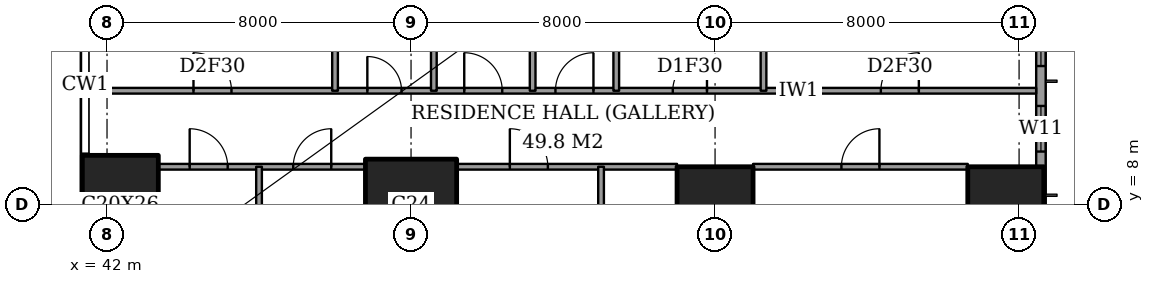
"""IFC4 building model, lengths in metres.
Left out: names, types, materials, properties, quantities, classifications, styles, units other than length and angle.
Written with IfcOpenShell. Run it as: python <this file> out.ifc"""

import sys

from ifc_helpers import new_model, si_unit, direction, frame, frame_2d, origin, origin_2d, place, context, subcontext, project, spatial, rectangle, extrude, element, fill, save


model = new_model("IFC4")
c1 = context("Model", 3, precision=1e-05, world=origin(), true_north=direction((0.0, 1.0)))
c2 = subcontext(c1, "Body", "Model", "MODEL_VIEW")
j1 = project(units=[si_unit("LENGTHUNIT", "METRE"), si_unit("PLANEANGLEUNIT", "RADIAN")], contexts=[c1])
p1 = place(None, origin())
s1 = spatial("IfcSite", under=j1, at=p1, CompositionType="ELEMENT")
p2 = place(p1, origin())
s2 = spatial("IfcBuilding", under=s1, at=p2, CompositionType="ELEMENT")
p3 = place(p2, frame((0.0, 0.0, 164.6)))
s3 = spatial("IfcBuildingStorey", under=s2, at=p3, CompositionType="ELEMENT", Elevation=164.6)
p4 = place(p3, frame((42.35, 8.0, 0.0), z_axis=(0.0, 0.0, 1.0), x_axis=(1.0, 0.0, 0.0)))
e1 = element("IfcColumn", 1, at=p4, inside=s3, PredefinedType="COLUMN", context=c2, shape_type="SweptSolid", body=[
    extrude(rectangle(XDim=2.0, YDim=2.6, at=origin_2d()), origin(), (0.0, 0.0, 1.0), 3.6),
])
p5 = place(p3, frame((50.0, 8.0, 0.0), z_axis=(0.0, 0.0, 1.0), x_axis=(1.0, 0.0, 0.0)))
e2 = element("IfcColumn", 2, at=p5, inside=s3, PredefinedType="COLUMN", context=c2, shape_type="SweptSolid", body=[
    extrude(rectangle(XDim=2.4, YDim=2.4, at=origin_2d()), origin(), (0.0, 0.0, 1.0), 3.6),
])
for number, where, z_axis, x_axis in (
    (3, (58.0, 8.0, 0.0), (0.0, 0.0, 1.0), (1.0, 0.0, 0.0)),
    (4, (65.65, 8.0, 0.0), (0.0, 0.0, 1.0), (1.0, 0.0, 0.0)),
):
    element("IfcColumn", number, at=place(p3, frame(where, z_axis=z_axis, x_axis=x_axis)), inside=s3, PredefinedType="COLUMN", context=c2, shape_type="SweptSolid", body=[
        extrude(rectangle(XDim=2.0, YDim=2.0, at=origin_2d()), origin(), (0.0, 0.0, 1.0), 3.6),
    ])
p6 = place(p3, frame((66.575, 3.175, 0.0), z_axis=(0.0, 0.0, 1.0), x_axis=(0.0, 1.0, 0.0)))
e5 = element("IfcWall", 5, at=p6, inside=s3, PredefinedType="SOLIDWALL", context=c2, shape_type="SweptSolid", body=[
    extrude(rectangle(XDim=41.65, YDim=0.25, at=frame_2d((20.825, 0.0))), origin(), (0.0, 0.0, 1.0), 3.6),
])
p7 = place(p6, frame((0.775, 0.0, 0.4)))
e6 = element("IfcOpeningElement", 6, at=p7, cuts=e5, PredefinedType="OPENING", context=c2, shape_type="SweptSolid", body=[
    extrude(rectangle(XDim=2.4, YDim=2.2, at=frame_2d((1.2, 1.1))), frame((0.0, 0.135, 0.0), z_axis=(0.0, -1.0, 0.0), x_axis=(1.0, 0.0, 0.0)), (0.0, 0.0, 1.0), 0.27),
])
p8 = place(p6, frame((6.225, 0.0, 0.4)))
e7 = element("IfcOpeningElement", 7, at=p8, cuts=e5, PredefinedType="OPENING", context=c2, shape_type="SweptSolid", body=[
    extrude(rectangle(XDim=1.2, YDim=2.2, at=frame_2d((0.6, 1.1))), frame((0.0, 0.135, 0.0), z_axis=(0.0, -1.0, 0.0), x_axis=(1.0, 0.0, 0.0)), (0.0, 0.0, 1.0), 0.27),
])
p9 = place(p6, frame((8.475, 0.0, 0.4)))
e8 = element("IfcOpeningElement", 8, at=p9, cuts=e5, PredefinedType="OPENING", context=c2, shape_type="SweptSolid", body=[
    extrude(rectangle(XDim=2.4, YDim=2.2, at=frame_2d((1.2, 1.1))), frame((0.0, 0.135, 0.0), z_axis=(0.0, -1.0, 0.0), x_axis=(1.0, 0.0, 0.0)), (0.0, 0.0, 1.0), 0.27),
])
p10 = place(p6, frame((15.775, 0.0, 0.4)))
e9 = element("IfcOpeningElement", 9, at=p10, cuts=e5, PredefinedType="OPENING", context=c2, shape_type="SweptSolid", body=[
    extrude(rectangle(XDim=2.4, YDim=2.2, at=frame_2d((1.2, 1.1))), frame((0.0, 0.135, 0.0), z_axis=(0.0, -1.0, 0.0), x_axis=(1.0, 0.0, 0.0)), (0.0, 0.0, 1.0), 0.27),
])
p11 = place(p6, frame((23.475, 0.0, 0.4)))
e10 = element("IfcOpeningElement", 10, at=p11, cuts=e5, PredefinedType="OPENING", context=c2, shape_type="SweptSolid", body=[
    extrude(rectangle(XDim=2.4, YDim=2.2, at=frame_2d((1.2, 1.1))), frame((0.0, 0.135, 0.0), z_axis=(0.0, -1.0, 0.0), x_axis=(1.0, 0.0, 0.0)), (0.0, 0.0, 1.0), 0.27),
])
p12 = place(p6, frame((30.975, 0.0, 0.4)))
e11 = element("IfcOpeningElement", 11, at=p12, cuts=e5, PredefinedType="OPENING", context=c2, shape_type="SweptSolid", body=[
    extrude(rectangle(XDim=2.4, YDim=2.2, at=frame_2d((1.2, 1.1))), frame((0.0, 0.135, 0.0), z_axis=(0.0, -1.0, 0.0), x_axis=(1.0, 0.0, 0.0)), (0.0, 0.0, 1.0), 0.27),
])
p13 = place(p6, frame((34.5, 0.0, 0.4)))
e12 = element("IfcOpeningElement", 12, at=p13, cuts=e5, PredefinedType="OPENING", context=c2, shape_type="SweptSolid", body=[
    extrude(rectangle(XDim=1.2, YDim=2.2, at=frame_2d((0.6, 1.1))), frame((0.0, 0.135, 0.0), z_axis=(0.0, -1.0, 0.0), x_axis=(1.0, 0.0, 0.0)), (0.0, 0.0, 1.0), 0.27),
])
p14 = place(p6, frame((38.475, 0.0, 0.4)))
e13 = element("IfcOpeningElement", 13, at=p14, cuts=e5, PredefinedType="OPENING", context=c2, shape_type="SweptSolid", body=[
    extrude(rectangle(XDim=2.4, YDim=2.2, at=frame_2d((1.2, 1.1))), frame((0.0, 0.135, 0.0), z_axis=(0.0, -1.0, 0.0), x_axis=(1.0, 0.0, 0.0)), (0.0, 0.0, 1.0), 0.27),
])
p15 = place(p3, frame((43.35, 9.0, 0.0), z_axis=(0.0, 0.0, 1.0), x_axis=(1.0, 0.0, 0.0)))
e14 = element("IfcWall", 14, at=p15, inside=s3, PredefinedType="PARTITIONING", context=c2, shape_type="SweptSolid", body=[
    extrude(rectangle(XDim=5.45, YDim=0.15, at=frame_2d((2.725, 0.0))), origin(), (0.0, 0.0, 1.0), 3.35),
])
p16 = place(p15, frame((3.55, 0.0, 0.0)))
e15 = element("IfcOpeningElement", 15, at=p16, cuts=e14, PredefinedType="OPENING", context=c2, shape_type="SweptSolid", body=[
    extrude(rectangle(XDim=1.0, YDim=2.1, at=frame_2d((0.5, 1.05))), frame((0.0, 0.085, 0.0), z_axis=(0.0, -1.0, 0.0), x_axis=(1.0, 0.0, 0.0)), (0.0, 0.0, 1.0), 0.17),
])
p17 = place(p15, frame((0.825, 0.0, 0.0)))
e16 = element("IfcOpeningElement", 16, at=p17, cuts=e14, PredefinedType="OPENING", context=c2, shape_type="SweptSolid", body=[
    extrude(rectangle(XDim=1.0, YDim=2.1, at=frame_2d((0.5, 1.05))), frame((0.0, 0.085, 0.0), z_axis=(0.0, -1.0, 0.0), x_axis=(1.0, 0.0, 0.0)), (0.0, 0.0, 1.0), 0.17),
])
p18 = place(p3, frame((51.2, 9.0, 0.0), z_axis=(0.0, 0.0, 1.0), x_axis=(1.0, 0.0, 0.0)))
e17 = element("IfcWall", 17, at=p18, inside=s3, PredefinedType="PARTITIONING", context=c2, shape_type="SweptSolid", body=[
    extrude(rectangle(XDim=5.8, YDim=0.15, at=frame_2d((2.9, 0.0))), origin(), (0.0, 0.0, 1.0), 3.35),
])
p19 = place(p18, frame((1.4, 0.0, 0.0)))
e18 = element("IfcOpeningElement", 18, at=p19, cuts=e17, PredefinedType="OPENING", context=c2, shape_type="SweptSolid", body=[
    extrude(rectangle(XDim=1.0, YDim=2.1, at=frame_2d((0.5, 1.05))), frame((0.0, 0.085, 0.0), z_axis=(0.0, -1.0, 0.0), x_axis=(1.0, 0.0, 0.0)), (0.0, 0.0, 1.0), 0.17),
])
p20 = place(p3, frame((59.0, 9.0, 0.0), z_axis=(0.0, 0.0, 1.0), x_axis=(1.0, 0.0, 0.0)))
e19 = element("IfcWall", 19, at=p20, inside=s3, PredefinedType="PARTITIONING", context=c2, shape_type="SweptSolid", body=[
    extrude(rectangle(XDim=5.65, YDim=0.15, at=frame_2d((2.825, 0.0))), origin(), (0.0, 0.0, 1.0), 3.35),
])
p21 = place(p20, frame((2.325, 0.0, 0.0)))
e20 = element("IfcOpeningElement", 20, at=p21, cuts=e19, PredefinedType="OPENING", context=c2, shape_type="SweptSolid", body=[
    extrude(rectangle(XDim=1.0, YDim=2.1, at=frame_2d((0.5, 1.05))), frame((0.0, 0.085, 0.0), z_axis=(0.0, -1.0, 0.0), x_axis=(1.0, 0.0, 0.0)), (0.0, 0.0, 1.0), 0.17),
])
p22 = place(p3, frame((41.439, 11.0, 0.0), z_axis=(0.0, 0.0, 1.0), x_axis=(1.0, 0.0, 0.0)))
e21 = element("IfcWall", 21, at=p22, inside=s3, PredefinedType="PARTITIONING", context=c2, shape_type="SweptSolid", body=[
    extrude(rectangle(XDim=25.011, YDim=0.15, at=frame_2d((12.505, 0.0))), origin(), (0.0, 0.0, 1.0), 3.35),
])
p23 = place(p22, frame((12.361, 0.0, 0.0)))
e22 = element("IfcOpeningElement", 22, at=p23, cuts=e21, PredefinedType="OPENING", context=c2, shape_type="SweptSolid", body=[
    extrude(rectangle(XDim=1.0, YDim=2.1, at=frame_2d((0.5, 1.05))), frame((0.0, 0.085, 0.0), z_axis=(0.0, -1.0, 0.0), x_axis=(1.0, 0.0, 0.0)), (0.0, 0.0, 1.0), 0.17),
])
p24 = place(p22, frame((20.924, 0.0, 0.0)))
e23 = element("IfcOpeningElement", 23, at=p24, cuts=e21, PredefinedType="OPENING", context=c2, shape_type="SweptSolid", body=[
    extrude(rectangle(XDim=1.0, YDim=2.1, at=frame_2d((0.5, 1.05))), frame((0.0, 0.085, 0.0), z_axis=(0.0, -1.0, 0.0), x_axis=(1.0, 0.0, 0.0)), (0.0, 0.0, 1.0), 0.17),
])
p25 = place(p22, frame((15.448, 0.0, 0.0)))
e24 = element("IfcOpeningElement", 24, at=p25, cuts=e21, PredefinedType="OPENING", context=c2, shape_type="SweptSolid", body=[
    extrude(rectangle(XDim=0.9, YDim=2.1, at=frame_2d((0.45, 1.05))), frame((0.0, 0.085, 0.0), z_axis=(0.0, -1.0, 0.0), x_axis=(1.0, 0.0, 0.0)), (0.0, 0.0, 1.0), 0.17),
])
p26 = place(p22, frame((9.961, 0.0, 0.0)))
e25 = element("IfcOpeningElement", 25, at=p26, cuts=e21, PredefinedType="OPENING", context=c2, shape_type="SweptSolid", body=[
    extrude(rectangle(XDim=1.0, YDim=2.1, at=frame_2d((0.5, 1.05))), frame((0.0, 0.085, 0.0), z_axis=(0.0, -1.0, 0.0), x_axis=(1.0, 0.0, 0.0)), (0.0, 0.0, 1.0), 0.17),
])
p27 = place(p22, frame((7.411, 0.0, 0.0)))
e26 = element("IfcOpeningElement", 26, at=p27, cuts=e21, PredefinedType="OPENING", context=c2, shape_type="SweptSolid", body=[
    extrude(rectangle(XDim=0.9, YDim=2.1, at=frame_2d((0.45, 1.05))), frame((0.0, 0.085, 0.0), z_axis=(0.0, -1.0, 0.0), x_axis=(1.0, 0.0, 0.0)), (0.0, 0.0, 1.0), 0.17),
])
p28 = place(p22, frame((2.836, 0.0, 0.0)))
e27 = element("IfcOpeningElement", 27, at=p28, cuts=e21, PredefinedType="OPENING", context=c2, shape_type="SweptSolid", body=[
    extrude(rectangle(XDim=1.0, YDim=2.1, at=frame_2d((0.5, 1.05))), frame((0.0, 0.085, 0.0), z_axis=(0.0, -1.0, 0.0), x_axis=(1.0, 0.0, 0.0)), (0.0, 0.0, 1.0), 0.17),
])
p29 = place(p3, frame((46.0, -0.45, 0.0), z_axis=(0.0, 0.0, 1.0), x_axis=(0.0, 1.0, 0.0)))
e28 = element("IfcWall", 28, at=p29, inside=s3, PredefinedType="PARTITIONING", context=c2, shape_type="SweptSolid", body=[
    extrude(rectangle(XDim=9.45, YDim=0.15, at=frame_2d((4.725, 0.0))), origin(), (0.0, 0.0, 1.0), 3.35),
])
p30 = place(p3, frame((48.0, 11.0, 0.0), z_axis=(0.0, 0.0, 1.0), x_axis=(0.0, 1.0, 0.0)))
e29 = element("IfcWall", 29, at=p30, inside=s3, PredefinedType="PARTITIONING", context=c2, shape_type="SweptSolid", body=[
    extrude(rectangle(XDim=6.5, YDim=0.15, at=frame_2d((3.25, 0.0))), origin(), (0.0, 0.0, 1.0), 3.35),
])
p31 = place(p3, frame((50.6, 11.0, 0.0), z_axis=(0.0, 0.0, 1.0), x_axis=(0.0, 1.0, 0.0)))
e30 = element("IfcWall", 30, at=p31, inside=s3, PredefinedType="PARTITIONING", context=c2, shape_type="SweptSolid", body=[
    extrude(rectangle(XDim=3.8, YDim=0.15, at=frame_2d((1.9, 0.0))), origin(), (0.0, 0.0, 1.0), 3.35),
])
p32 = place(p3, frame((53.2, 11.0, 0.0), z_axis=(0.0, 0.0, 1.0), x_axis=(0.0, 1.0, 0.0)))
e31 = element("IfcWall", 31, at=p32, inside=s3, PredefinedType="PARTITIONING", context=c2, shape_type="SweptSolid", body=[
    extrude(rectangle(XDim=6.5, YDim=0.15, at=frame_2d((3.25, 0.0))), origin(), (0.0, 0.0, 1.0), 3.35),
])
p33 = place(p3, frame((55.0, -0.45, 0.0), z_axis=(0.0, 0.0, 1.0), x_axis=(0.0, 1.0, 0.0)))
e32 = element("IfcWall", 32, at=p33, inside=s3, PredefinedType="PARTITIONING", context=c2, shape_type="SweptSolid", body=[
    extrude(rectangle(XDim=9.45, YDim=0.15, at=frame_2d((4.725, 0.0))), origin(), (0.0, 0.0, 1.0), 3.35),
])
p34 = place(p3, frame((55.4, 11.0, 0.0), z_axis=(0.0, 0.0, 1.0), x_axis=(0.0, 1.0, 0.0)))
e33 = element("IfcWall", 33, at=p34, inside=s3, PredefinedType="PARTITIONING", context=c2, shape_type="SweptSolid", body=[
    extrude(rectangle(XDim=10.6, YDim=0.15, at=frame_2d((5.3, 0.0))), origin(), (0.0, 0.0, 1.0), 3.35),
])
p35 = place(p34, frame((8.05, 0.0, 0.0)))
e34 = element("IfcOpeningElement", 34, at=p35, cuts=e33, PredefinedType="OPENING", context=c2, shape_type="SweptSolid", body=[
    extrude(rectangle(XDim=1.0, YDim=2.1, at=frame_2d((0.5, 1.05))), frame((0.0, 0.085, 0.0), z_axis=(0.0, -1.0, 0.0), x_axis=(1.0, 0.0, 0.0)), (0.0, 0.0, 1.0), 0.17),
])
p36 = place(p3, frame((59.275, 11.0, 0.0), z_axis=(0.0, 0.0, 1.0), x_axis=(0.0, 1.0, 0.0)))
e35 = element("IfcWall", 35, at=p36, inside=s3, PredefinedType="PARTITIONING", context=c2, shape_type="SweptSolid", body=[
    extrude(rectangle(XDim=3.8, YDim=0.15, at=frame_2d((1.9, 0.0))), origin(), (0.0, 0.0, 1.0), 3.35),
])
p37 = place(p8, origin())
e36 = element("IfcWindow", 36, at=p37, inside=s3, PartitioningType="SINGLE_PANEL", PredefinedType="WINDOW", context=c2, shape_type="SweptSolid", body=[
    extrude(rectangle(XDim=1.2, YDim=2.2, at=frame_2d((0.6, 1.1))), frame((0.0, 0.03, 0.0), z_axis=(0.0, -1.0, 0.0), x_axis=(1.0, 0.0, 0.0)), (0.0, 0.0, 1.0), 0.06),
])
fill(e7, e36)
p38 = place(p9, origin())
e37 = element("IfcWindow", 37, at=p38, inside=s3, PartitioningType="SINGLE_PANEL", PredefinedType="WINDOW", context=c2, shape_type="SweptSolid", body=[
    extrude(rectangle(XDim=2.4, YDim=2.2, at=frame_2d((1.2, 1.1))), frame((0.0, 0.03, 0.0), z_axis=(0.0, -1.0, 0.0), x_axis=(1.0, 0.0, 0.0)), (0.0, 0.0, 1.0), 0.06),
])
fill(e8, e37)
p39 = place(p21, origin())
e38 = element("IfcDoor", 38, at=p39, inside=s3, OperationType="SINGLE_SWING_LEFT", PredefinedType="DOOR", context=c2, shape_type="SweptSolid", body=[
    extrude(rectangle(XDim=1.0, YDim=2.1, at=frame_2d((0.5, 1.05))), frame((0.0, 0.025, 0.0), z_axis=(0.0, -1.0, 0.0), x_axis=(1.0, 0.0, 0.0)), (0.0, 0.0, 1.0), 0.05),
])
fill(e20, e38)
p40 = place(p19, origin())
e39 = element("IfcDoor", 39, at=p40, inside=s3, OperationType="SINGLE_SWING_RIGHT", PredefinedType="DOOR", context=c2, shape_type="SweptSolid", body=[
    extrude(rectangle(XDim=1.0, YDim=2.1, at=frame_2d((0.5, 1.05))), frame((0.0, 0.025, 0.0), z_axis=(0.0, -1.0, 0.0), x_axis=(1.0, 0.0, 0.0)), (0.0, 0.0, 1.0), 0.05),
])
fill(e18, e39)
p41 = place(p16, origin())
e40 = element("IfcDoor", 40, at=p41, inside=s3, OperationType="SINGLE_SWING_LEFT", PredefinedType="DOOR", context=c2, shape_type="SweptSolid", body=[
    extrude(rectangle(XDim=1.0, YDim=2.1, at=frame_2d((0.5, 1.05))), frame((0.0, 0.025, 0.0), z_axis=(0.0, -1.0, 0.0), x_axis=(1.0, 0.0, 0.0)), (0.0, 0.0, 1.0), 0.05),
])
fill(e15, e40)
p42 = place(p17, origin())
e41 = element("IfcDoor", 41, at=p42, inside=s3, OperationType="SINGLE_SWING_RIGHT", PredefinedType="DOOR", context=c2, shape_type="SweptSolid", body=[
    extrude(rectangle(XDim=1.0, YDim=2.1, at=frame_2d((0.5, 1.05))), frame((0.0, 0.025, 0.0), z_axis=(0.0, -1.0, 0.0), x_axis=(1.0, 0.0, 0.0)), (0.0, 0.0, 1.0), 0.05),
])
fill(e16, e41)
p43 = place(p23, origin())
e42 = element("IfcDoor", 42, at=p43, inside=s3, OperationType="SINGLE_SWING_LEFT", PredefinedType="DOOR", context=c2, shape_type="SweptSolid", body=[
    extrude(rectangle(XDim=1.0, YDim=2.1, at=frame_2d((0.5, 1.05))), frame((0.0, 0.025, 0.0), z_axis=(0.0, -1.0, 0.0), x_axis=(1.0, 0.0, 0.0)), (0.0, 0.0, 1.0), 0.05),
])
fill(e22, e42)
p44 = place(p24, origin())
e43 = element("IfcDoor", 43, at=p44, inside=s3, OperationType="SINGLE_SWING_LEFT", PredefinedType="DOOR", context=c2, shape_type="SweptSolid", body=[
    extrude(rectangle(XDim=1.0, YDim=2.1, at=frame_2d((0.5, 1.05))), frame((0.0, 0.025, 0.0), z_axis=(0.0, -1.0, 0.0), x_axis=(1.0, 0.0, 0.0)), (0.0, 0.0, 1.0), 0.05),
])
fill(e23, e43)
p45 = place(p25, origin())
e44 = element("IfcDoor", 44, at=p45, inside=s3, OperationType="SINGLE_SWING_LEFT", PredefinedType="DOOR", context=c2, shape_type="SweptSolid", body=[
    extrude(rectangle(XDim=0.9, YDim=2.1, at=frame_2d((0.45, 1.05))), frame((0.0, 0.025, 0.0), z_axis=(0.0, -1.0, 0.0), x_axis=(1.0, 0.0, 0.0)), (0.0, 0.0, 1.0), 0.05),
])
fill(e24, e44)
p46 = place(p26, origin())
e45 = element("IfcDoor", 45, at=p46, inside=s3, OperationType="SINGLE_SWING_RIGHT", PredefinedType="DOOR", context=c2, shape_type="SweptSolid", body=[
    extrude(rectangle(XDim=1.0, YDim=2.1, at=frame_2d((0.5, 1.05))), frame((0.0, 0.025, 0.0), z_axis=(0.0, -1.0, 0.0), x_axis=(1.0, 0.0, 0.0)), (0.0, 0.0, 1.0), 0.05),
])
fill(e25, e45)
p47 = place(p27, origin())
e46 = element("IfcDoor", 46, at=p47, inside=s3, OperationType="SINGLE_SWING_RIGHT", PredefinedType="DOOR", context=c2, shape_type="SweptSolid", body=[
    extrude(rectangle(XDim=0.9, YDim=2.1, at=frame_2d((0.45, 1.05))), frame((0.0, 0.025, 0.0), z_axis=(0.0, -1.0, 0.0), x_axis=(1.0, 0.0, 0.0)), (0.0, 0.0, 1.0), 0.05),
])
fill(e26, e46)
p48 = place(p28, origin())
e47 = element("IfcDoor", 47, at=p48, inside=s3, OperationType="SINGLE_SWING_RIGHT", PredefinedType="DOOR", context=c2, shape_type="SweptSolid", body=[
    extrude(rectangle(XDim=1.0, YDim=2.1, at=frame_2d((0.5, 1.05))), frame((0.0, 0.025, 0.0), z_axis=(0.0, -1.0, 0.0), x_axis=(1.0, 0.0, 0.0)), (0.0, 0.0, 1.0), 0.05),
])
fill(e27, e47)
save(model, sys.argv[1])
